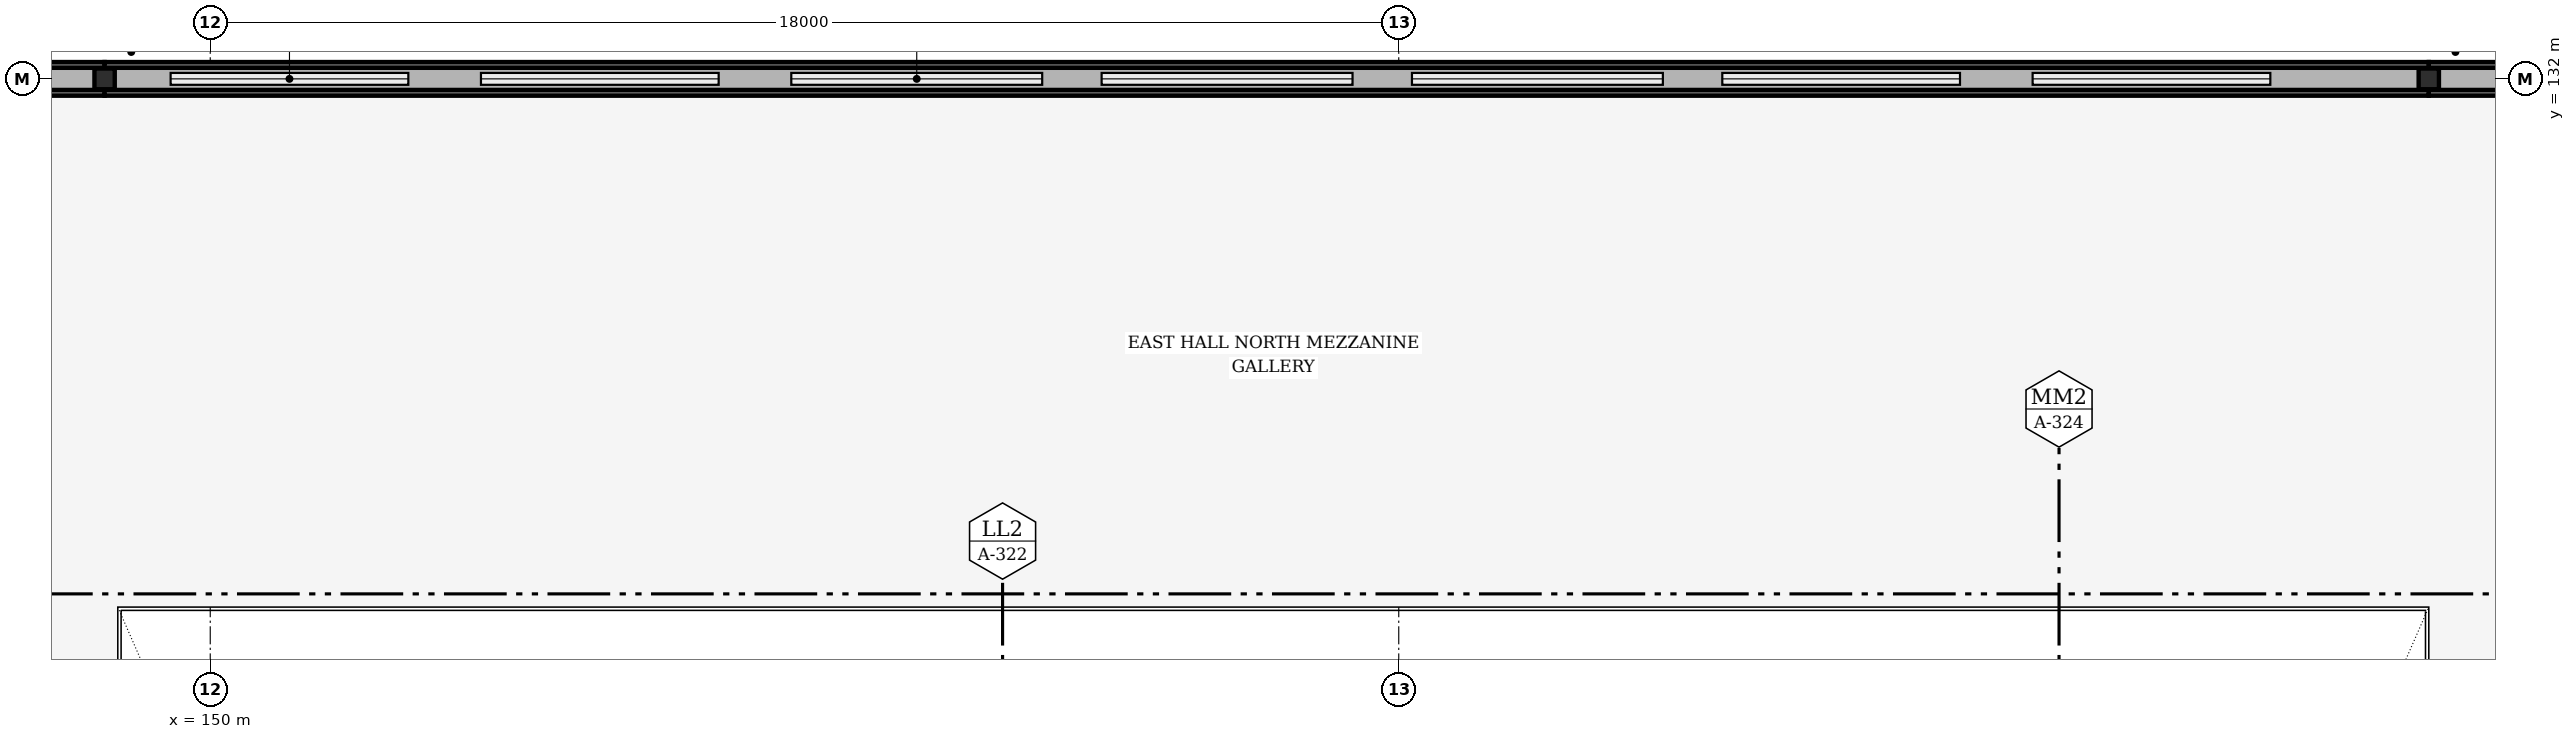
"""IFC4 building model, lengths in metres.
Left out: names, types, materials, properties, quantities, classifications, styles, units other than length and angle.
Written with IfcOpenShell. Run it as: python <this file> out.ifc"""

import sys

from ifc_helpers import new_model, si_unit, direction, frame, frame_2d, origin, origin_2d, place, context, subcontext, project, spatial, rectangle, i_section, extrude, element, save


model = new_model("IFC4")
c1 = context("Model", 3, precision=1e-05, world=origin(), true_north=direction((0.0, 1.0)))
c2 = subcontext(c1, "Body", "Model", "MODEL_VIEW")
j1 = project(units=[si_unit("LENGTHUNIT", "METRE"), si_unit("PLANEANGLEUNIT", "RADIAN")], contexts=[c1])
p1 = place(None, origin())
s1 = spatial("IfcSite", under=j1, at=p1, CompositionType="ELEMENT")
p2 = place(p1, origin())
s2 = spatial("IfcBuilding", under=s1, at=p2, CompositionType="ELEMENT")
p3 = place(p2, frame((0.0, 0.0, 5.4)))
s3 = spatial("IfcBuildingStorey", under=s2, at=p3, CompositionType="ELEMENT", Elevation=5.4)
for number, where, z_axis, x_axis in (
    (1, (148.4, 132.0, 0.0), (0.0, 0.0, 1.0), (1.0, 0.0, 0.0)),
    (2, (183.6, 132.0, 0.0), (0.0, 0.0, 1.0), (1.0, 0.0, 0.0)),
):
    element("IfcColumn", number, at=place(p3, frame(where, z_axis=z_axis, x_axis=x_axis)), inside=s3, PredefinedType="COLUMN", context=c2, shape_type="SweptSolid", body=[
        extrude(i_section(OverallWidth=0.307, OverallDepth=0.314, WebThickness=0.012, FlangeThickness=0.019, FilletRadius=0.015, at=origin_2d()), origin(), (0.0, 0.0, 1.0), 6.5),
    ])
p4 = place(p3, frame((148.4, 132.0, 0.0), z_axis=(0.0, 0.0, 1.0), x_axis=(-1.0, 0.0, 0.0)))
e3 = element("IfcWall", 3, at=p4, inside=s3, PredefinedType="SOLIDWALL", context=c2, shape_type="SweptSolid", body=[
    extrude(rectangle(XDim=10.4, YDim=0.51, at=frame_2d((5.2, 0.0))), origin(), (0.0, 0.0, 1.0), 6.4),
])
p5 = place(p3, frame((183.6, 132.0, 0.0), z_axis=(0.0, 0.0, 1.0), x_axis=(-1.0, 0.0, 0.0)))
e4 = element("IfcWall", 4, at=p5, inside=s3, PredefinedType="SOLIDWALL", context=c2, shape_type="SweptSolid", body=[
    extrude(rectangle(XDim=35.2, YDim=0.51, at=frame_2d((17.6, 0.0))), origin(), (0.0, 0.0, 1.0), 1.05),
])
p6 = place(p3, frame((192.0, 132.0, 0.0), z_axis=(0.0, 0.0, 1.0), x_axis=(-1.0, 0.0, 0.0)))
e5 = element("IfcWall", 5, at=p6, inside=s3, PredefinedType="SOLIDWALL", context=c2, shape_type="SweptSolid", body=[
    extrude(rectangle(XDim=8.4, YDim=0.51, at=frame_2d((4.2, 0.0))), origin(), (0.0, 0.0, 1.0), 6.4),
])
p7 = place(p3, frame((138.0, 132.0, 6.4), z_axis=(0.0, 0.0, 1.0), x_axis=(1.0, 0.0, 0.0)))
e6 = element("IfcWall", 6, at=p7, inside=s3, PredefinedType="SOLIDWALL", context=c2, shape_type="SweptSolid", body=[
    extrude(rectangle(XDim=10.4, YDim=0.335, at=frame_2d((5.2, 0.0))), origin(), (0.0, 0.0, 1.0), 2.118),
])
p8 = place(p3, frame((183.6, 132.0, 6.4), z_axis=(0.0, 0.0, 1.0), x_axis=(1.0, 0.0, 0.0)))
e7 = element("IfcWall", 7, at=p8, inside=s3, PredefinedType="SOLIDWALL", context=c2, shape_type="SweptSolid", body=[
    extrude(rectangle(XDim=8.4, YDim=0.335, at=frame_2d((4.2, 0.0))), origin(), (0.0, 0.0, 1.0), 2.118),
])
p9 = place(p3, frame((148.4, 132.0, 6.45), z_axis=(0.0, 0.0, 1.0), x_axis=(1.0, 0.0, 0.0)))
e8 = element("IfcWall", 8, at=p9, inside=s3, PredefinedType="SOLIDWALL", context=c2, shape_type="SweptSolid", body=[
    extrude(rectangle(XDim=35.2, YDim=0.335, at=frame_2d((17.6, 0.0))), origin(), (0.0, 0.0, 1.0), 3.15),
])
save(model, sys.argv[1])
